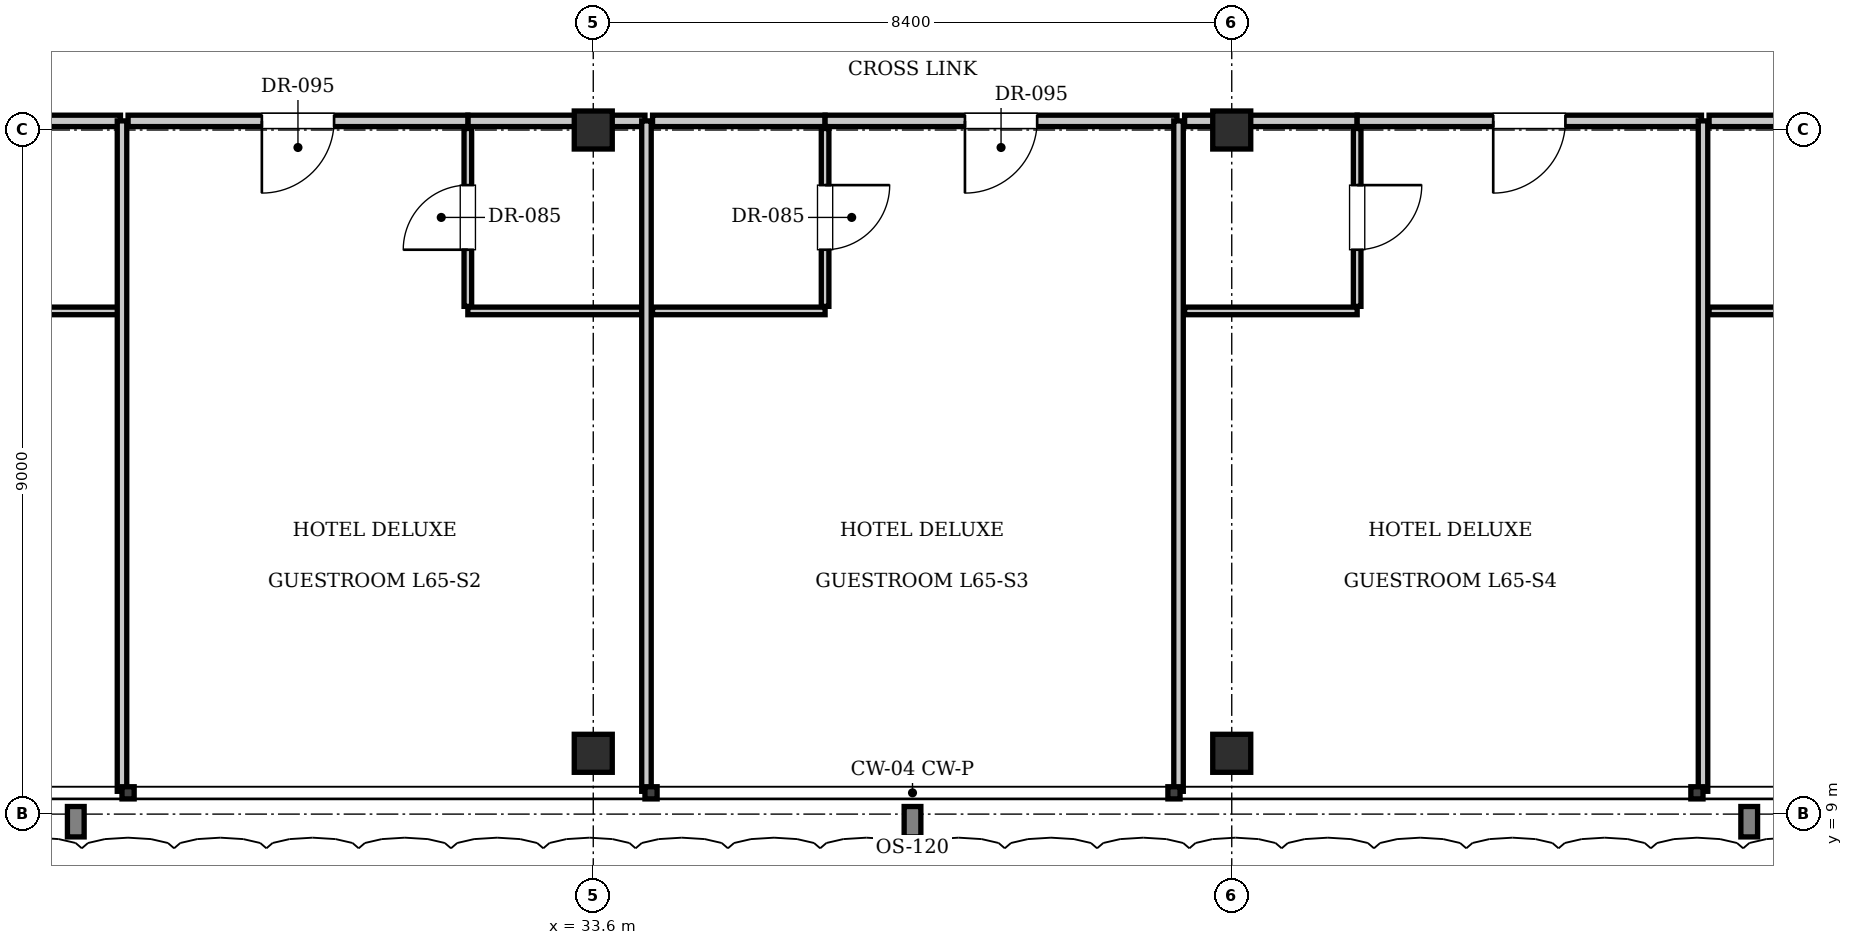
"""IFC4 building model, lengths in metres.
Left out: names, types, materials, properties, quantities, classifications, styles, units other than length and angle.
Written with IfcOpenShell. Run it as: python <this file> out.ifc"""

import sys

from ifc_helpers import new_model, si_unit, direction, frame, frame_2d, origin, origin_2d, place, context, subcontext, project, spatial, rectangle, i_section, extrude, element, fill, save


model = new_model("IFC4")
c1 = context("Model", 3, precision=1e-05, world=origin(), true_north=direction((0.0, 1.0)))
c2 = subcontext(c1, "Body", "Model", "MODEL_VIEW")
j1 = project(units=[si_unit("LENGTHUNIT", "METRE"), si_unit("PLANEANGLEUNIT", "RADIAN")], contexts=[c1])
p1 = place(None, origin())
s1 = spatial("IfcSite", under=j1, at=p1, CompositionType="ELEMENT")
p2 = place(p1, origin())
s2 = spatial("IfcBuilding", under=s1, at=p2, CompositionType="ELEMENT")
p3 = place(p2, frame((0.0, 0.0, 266.35)))
s3 = spatial("IfcBuildingStorey", under=s2, at=p3, CompositionType="ELEMENT", Elevation=266.35)
for number, where, z_axis, x_axis in (
    (1, (33.6, 18.0, 0.0), (0.0, 0.0, 1.0), (1.0, 0.0, 0.0)),
    (2, (42.0, 18.0, 0.0), (0.0, 0.0, 1.0), (1.0, 0.0, 0.0)),
    (3, (33.6, 9.8, 0.0), (0.0, 0.0, 1.0), (1.0, 0.0, 0.0)),
    (4, (42.0, 9.8, 0.0), (0.0, 0.0, 1.0), (1.0, 0.0, 0.0)),
):
    element("IfcColumn", number, at=place(p3, frame(where, z_axis=z_axis, x_axis=x_axis)), inside=s3, PredefinedType="COLUMN", context=c2, shape_type="SweptSolid", body=[
        extrude(i_section(OverallWidth=0.5, OverallDepth=0.5, WebThickness=0.022, FlangeThickness=0.032, at=origin_2d()), origin(), (0.0, 0.0, 1.0), 3.85),
    ])
p4 = place(p3, frame((25.05, 18.12, 0.0), z_axis=(0.0, 0.0, 1.0), x_axis=(1.0, 0.0, 0.0)))
e5 = element("IfcWall", 5, at=p4, inside=s3, PredefinedType="PARTITIONING", context=c2, shape_type="SweptSolid", body=[
    extrude(rectangle(XDim=2.33, YDim=0.15, at=frame_2d((1.165, 0.0))), origin(), (0.0, 0.0, 1.0), 3.077),
])
p5 = place(p3, frame((25.05, 15.62, 0.0), z_axis=(0.0, 0.0, 1.0), x_axis=(1.0, 0.0, 0.0)))
e6 = element("IfcWall", 6, at=p5, inside=s3, PredefinedType="PARTITIONING", context=c2, shape_type="SweptSolid", body=[
    extrude(rectangle(XDim=2.31, YDim=0.1, at=frame_2d((1.155, 0.0))), origin(), (0.0, 0.0, 1.0), 3.61),
])
p6 = place(p3, frame((27.4, 9.3, 0.0), z_axis=(0.0, 0.0, 1.0), x_axis=(0.0, 1.0, 0.0)))
e7 = element("IfcWall", 7, at=p6, inside=s3, PredefinedType="PARTITIONING", context=c2, shape_type="SweptSolid", body=[
    extrude(rectangle(XDim=8.82, YDim=0.125, at=frame_2d((4.41, 0.0))), origin(), (0.0, 0.0, 1.0), 3.61),
])
p7 = place(p3, frame((31.95, 18.12, 0.0), z_axis=(0.0, 0.0, 1.0), x_axis=(1.0, 0.0, 0.0)))
e8 = element("IfcWall", 8, at=p7, inside=s3, PredefinedType="PARTITIONING", context=c2, shape_type="SweptSolid", body=[
    extrude(rectangle(XDim=2.33, YDim=0.15, at=frame_2d((1.165, 0.0))), origin(), (0.0, 0.0, 1.0), 3.077),
])
p8 = place(p3, frame((31.95, 15.62, 0.0), z_axis=(0.0, 0.0, 1.0), x_axis=(1.0, 0.0, 0.0)))
e9 = element("IfcWall", 9, at=p8, inside=s3, PredefinedType="PARTITIONING", context=c2, shape_type="SweptSolid", body=[
    extrude(rectangle(XDim=2.31, YDim=0.1, at=frame_2d((1.155, 0.0))), origin(), (0.0, 0.0, 1.0), 3.61),
])
p9 = place(p3, frame((31.95, 15.68, 0.0), z_axis=(0.0, 0.0, 1.0), x_axis=(0.0, 1.0, 0.0)))
e10 = element("IfcWall", 10, at=p9, inside=s3, PredefinedType="PARTITIONING", context=c2, shape_type="SweptSolid", body=[
    extrude(rectangle(XDim=2.34, YDim=0.1, at=frame_2d((1.17, 0.0))), origin(), (0.0, 0.0, 1.0), 3.61),
])
p10 = place(p9, frame((0.745, 0.0, 0.0)))
e11 = element("IfcOpeningElement", 11, at=p10, cuts=e10, PredefinedType="OPENING", context=c2, shape_type="SweptSolid", body=[
    extrude(rectangle(XDim=0.85, YDim=2.1, at=frame_2d((0.425, 1.05))), frame((0.0, 0.06, 0.0), z_axis=(0.0, -1.0, 0.0), x_axis=(1.0, 0.0, 0.0)), (0.0, 0.0, 1.0), 0.12),
])
p11 = place(p3, frame((27.48, 18.12, 0.0), z_axis=(0.0, 0.0, 1.0), x_axis=(1.0, 0.0, 0.0)))
e12 = element("IfcWall", 12, at=p11, inside=s3, PredefinedType="PARTITIONING", context=c2, shape_type="SweptSolid", body=[
    extrude(rectangle(XDim=4.47, YDim=0.15, at=frame_2d((2.235, 0.0))), origin(), (0.0, 0.0, 1.0), 3.077),
])
p12 = place(p11, frame((1.76, 0.0, 0.0)))
e13 = element("IfcOpeningElement", 13, at=p12, cuts=e12, PredefinedType="OPENING", context=c2, shape_type="SweptSolid", body=[
    extrude(rectangle(XDim=0.95, YDim=2.15, at=frame_2d((0.475, 1.075))), frame((0.0, 0.085, 0.0), z_axis=(0.0, -1.0, 0.0), x_axis=(1.0, 0.0, 0.0)), (0.0, 0.0, 1.0), 0.17),
])
p13 = place(p3, frame((34.3, 9.3, 0.0), z_axis=(0.0, 0.0, 1.0), x_axis=(0.0, 1.0, 0.0)))
e14 = element("IfcWall", 14, at=p13, inside=s3, PredefinedType="PARTITIONING", context=c2, shape_type="SweptSolid", body=[
    extrude(rectangle(XDim=8.82, YDim=0.125, at=frame_2d((4.41, 0.0))), origin(), (0.0, 0.0, 1.0), 3.61),
])
p14 = place(p3, frame((34.38, 18.12, 0.0), z_axis=(0.0, 0.0, 1.0), x_axis=(1.0, 0.0, 0.0)))
e15 = element("IfcWall", 15, at=p14, inside=s3, PredefinedType="PARTITIONING", context=c2, shape_type="SweptSolid", body=[
    extrude(rectangle(XDim=2.27, YDim=0.15, at=frame_2d((1.135, 0.0))), origin(), (0.0, 0.0, 1.0), 3.077),
])
p15 = place(p3, frame((34.38, 15.62, 0.0), z_axis=(0.0, 0.0, 1.0), x_axis=(1.0, 0.0, 0.0)))
e16 = element("IfcWall", 16, at=p15, inside=s3, PredefinedType="PARTITIONING", context=c2, shape_type="SweptSolid", body=[
    extrude(rectangle(XDim=2.27, YDim=0.1, at=frame_2d((1.135, 0.0))), origin(), (0.0, 0.0, 1.0), 3.61),
])
p16 = place(p3, frame((36.65, 15.68, 0.0), z_axis=(0.0, 0.0, 1.0), x_axis=(0.0, 1.0, 0.0)))
e17 = element("IfcWall", 17, at=p16, inside=s3, PredefinedType="PARTITIONING", context=c2, shape_type="SweptSolid", body=[
    extrude(rectangle(XDim=2.34, YDim=0.1, at=frame_2d((1.17, 0.0))), origin(), (0.0, 0.0, 1.0), 3.61),
])
p17 = place(p16, frame((0.745, 0.0, 0.0)))
e18 = element("IfcOpeningElement", 18, at=p17, cuts=e17, PredefinedType="OPENING", context=c2, shape_type="SweptSolid", body=[
    extrude(rectangle(XDim=0.85, YDim=2.1, at=frame_2d((0.425, 1.05))), frame((0.0, 0.06, 0.0), z_axis=(0.0, -1.0, 0.0), x_axis=(1.0, 0.0, 0.0)), (0.0, 0.0, 1.0), 0.12),
])
p18 = place(p3, frame((36.65, 18.12, 0.0), z_axis=(0.0, 0.0, 1.0), x_axis=(1.0, 0.0, 0.0)))
e19 = element("IfcWall", 19, at=p18, inside=s3, PredefinedType="PARTITIONING", context=c2, shape_type="SweptSolid", body=[
    extrude(rectangle(XDim=4.63, YDim=0.15, at=frame_2d((2.315, 0.0))), origin(), (0.0, 0.0, 1.0), 3.077),
])
p19 = place(p18, frame((1.84, 0.0, 0.0)))
e20 = element("IfcOpeningElement", 20, at=p19, cuts=e19, PredefinedType="OPENING", context=c2, shape_type="SweptSolid", body=[
    extrude(rectangle(XDim=0.95, YDim=2.15, at=frame_2d((0.475, 1.075))), frame((0.0, 0.085, 0.0), z_axis=(0.0, -1.0, 0.0), x_axis=(1.0, 0.0, 0.0)), (0.0, 0.0, 1.0), 0.17),
])
p20 = place(p3, frame((41.3, 9.3, 0.0), z_axis=(0.0, 0.0, 1.0), x_axis=(0.0, 1.0, 0.0)))
e21 = element("IfcWall", 21, at=p20, inside=s3, PredefinedType="PARTITIONING", context=c2, shape_type="SweptSolid", body=[
    extrude(rectangle(XDim=8.82, YDim=0.125, at=frame_2d((4.41, 0.0))), origin(), (0.0, 0.0, 1.0), 3.61),
])
p21 = place(p3, frame((41.38, 18.12, 0.0), z_axis=(0.0, 0.0, 1.0), x_axis=(1.0, 0.0, 0.0)))
e22 = element("IfcWall", 22, at=p21, inside=s3, PredefinedType="PARTITIONING", context=c2, shape_type="SweptSolid", body=[
    extrude(rectangle(XDim=2.27, YDim=0.15, at=frame_2d((1.135, 0.0))), origin(), (0.0, 0.0, 1.0), 3.077),
])
p22 = place(p3, frame((41.38, 15.62, 0.0), z_axis=(0.0, 0.0, 1.0), x_axis=(1.0, 0.0, 0.0)))
e23 = element("IfcWall", 23, at=p22, inside=s3, PredefinedType="PARTITIONING", context=c2, shape_type="SweptSolid", body=[
    extrude(rectangle(XDim=2.27, YDim=0.1, at=frame_2d((1.135, 0.0))), origin(), (0.0, 0.0, 1.0), 3.61),
])
p23 = place(p3, frame((43.65, 15.68, 0.0), z_axis=(0.0, 0.0, 1.0), x_axis=(0.0, 1.0, 0.0)))
e24 = element("IfcWall", 24, at=p23, inside=s3, PredefinedType="PARTITIONING", context=c2, shape_type="SweptSolid", body=[
    extrude(rectangle(XDim=2.34, YDim=0.1, at=frame_2d((1.17, 0.0))), origin(), (0.0, 0.0, 1.0), 3.61),
])
p24 = place(p23, frame((0.745, 0.0, 0.0)))
e25 = element("IfcOpeningElement", 25, at=p24, cuts=e24, PredefinedType="OPENING", context=c2, shape_type="SweptSolid", body=[
    extrude(rectangle(XDim=0.85, YDim=2.1, at=frame_2d((0.425, 1.05))), frame((0.0, 0.06, 0.0), z_axis=(0.0, -1.0, 0.0), x_axis=(1.0, 0.0, 0.0)), (0.0, 0.0, 1.0), 0.12),
])
p25 = place(p3, frame((43.65, 18.12, 0.0), z_axis=(0.0, 0.0, 1.0), x_axis=(1.0, 0.0, 0.0)))
e26 = element("IfcWall", 26, at=p25, inside=s3, PredefinedType="PARTITIONING", context=c2, shape_type="SweptSolid", body=[
    extrude(rectangle(XDim=4.53, YDim=0.15, at=frame_2d((2.265, 0.0))), origin(), (0.0, 0.0, 1.0), 3.077),
])
p26 = place(p25, frame((1.79, 0.0, 0.0)))
e27 = element("IfcOpeningElement", 27, at=p26, cuts=e26, PredefinedType="OPENING", context=c2, shape_type="SweptSolid", body=[
    extrude(rectangle(XDim=0.95, YDim=2.15, at=frame_2d((0.475, 1.075))), frame((0.0, 0.085, 0.0), z_axis=(0.0, -1.0, 0.0), x_axis=(1.0, 0.0, 0.0)), (0.0, 0.0, 1.0), 0.17),
])
p27 = place(p3, frame((48.2, 9.3, 0.0), z_axis=(0.0, 0.0, 1.0), x_axis=(0.0, 1.0, 0.0)))
e28 = element("IfcWall", 28, at=p27, inside=s3, PredefinedType="PARTITIONING", context=c2, shape_type="SweptSolid", body=[
    extrude(rectangle(XDim=8.82, YDim=0.125, at=frame_2d((4.41, 0.0))), origin(), (0.0, 0.0, 1.0), 3.61),
])
p28 = place(p3, frame((48.28, 18.12, 0.0), z_axis=(0.0, 0.0, 1.0), x_axis=(1.0, 0.0, 0.0)))
e29 = element("IfcWall", 29, at=p28, inside=s3, PredefinedType="PARTITIONING", context=c2, shape_type="SweptSolid", body=[
    extrude(rectangle(XDim=2.27, YDim=0.15, at=frame_2d((1.135, 0.0))), origin(), (0.0, 0.0, 1.0), 3.077),
])
p29 = place(p3, frame((48.28, 15.62, 0.0), z_axis=(0.0, 0.0, 1.0), x_axis=(1.0, 0.0, 0.0)))
e30 = element("IfcWall", 30, at=p29, inside=s3, PredefinedType="PARTITIONING", context=c2, shape_type="SweptSolid", body=[
    extrude(rectangle(XDim=2.27, YDim=0.1, at=frame_2d((1.135, 0.0))), origin(), (0.0, 0.0, 1.0), 3.61),
])
p30 = place(p10, origin())
e31 = element("IfcDoor", 31, at=p30, inside=s3, OperationType="SINGLE_SWING_LEFT", PredefinedType="DOOR", context=c2, shape_type="SweptSolid", body=[
    extrude(rectangle(XDim=0.85, YDim=2.1, at=frame_2d((0.425, 1.05))), frame((0.0, 0.025, 0.0), z_axis=(0.0, -1.0, 0.0), x_axis=(1.0, 0.0, 0.0)), (0.0, 0.0, 1.0), 0.05),
])
fill(e11, e31)
p31 = place(p12, frame((0.95, 0.0, 0.0), z_axis=(0.0, 0.0, 1.0), x_axis=(-1.0, 0.0, 0.0)))
e32 = element("IfcDoor", 32, at=p31, inside=s3, OperationType="SINGLE_SWING_RIGHT", PredefinedType="DOOR", context=c2, shape_type="SweptSolid", body=[
    extrude(rectangle(XDim=0.95, YDim=2.15, at=frame_2d((0.475, 1.075))), frame((0.0, 0.025, 0.0), z_axis=(0.0, -1.0, 0.0), x_axis=(1.0, 0.0, 0.0)), (0.0, 0.0, 1.0), 0.05),
])
fill(e13, e32)
p32 = place(p17, frame((0.85, 0.0, 0.0), z_axis=(0.0, 0.0, 1.0), x_axis=(-1.0, 0.0, 0.0)))
e33 = element("IfcDoor", 33, at=p32, inside=s3, OperationType="SINGLE_SWING_LEFT", PredefinedType="DOOR", context=c2, shape_type="SweptSolid", body=[
    extrude(rectangle(XDim=0.85, YDim=2.1, at=frame_2d((0.425, 1.05))), frame((0.0, 0.025, 0.0), z_axis=(0.0, -1.0, 0.0), x_axis=(1.0, 0.0, 0.0)), (0.0, 0.0, 1.0), 0.05),
])
fill(e18, e33)
p33 = place(p19, frame((0.95, 0.0, 0.0), z_axis=(0.0, 0.0, 1.0), x_axis=(-1.0, 0.0, 0.0)))
e34 = element("IfcDoor", 34, at=p33, inside=s3, OperationType="SINGLE_SWING_RIGHT", PredefinedType="DOOR", context=c2, shape_type="SweptSolid", body=[
    extrude(rectangle(XDim=0.95, YDim=2.15, at=frame_2d((0.475, 1.075))), frame((0.0, 0.025, 0.0), z_axis=(0.0, -1.0, 0.0), x_axis=(1.0, 0.0, 0.0)), (0.0, 0.0, 1.0), 0.05),
])
fill(e20, e34)
p34 = place(p24, frame((0.85, 0.0, 0.0), z_axis=(0.0, 0.0, 1.0), x_axis=(-1.0, 0.0, 0.0)))
e35 = element("IfcDoor", 35, at=p34, inside=s3, OperationType="SINGLE_SWING_LEFT", PredefinedType="DOOR", context=c2, shape_type="SweptSolid", body=[
    extrude(rectangle(XDim=0.85, YDim=2.1, at=frame_2d((0.425, 1.05))), frame((0.0, 0.025, 0.0), z_axis=(0.0, -1.0, 0.0), x_axis=(1.0, 0.0, 0.0)), (0.0, 0.0, 1.0), 0.05),
])
fill(e25, e35)
p35 = place(p26, frame((0.95, 0.0, 0.0), z_axis=(0.0, 0.0, 1.0), x_axis=(-1.0, 0.0, 0.0)))
e36 = element("IfcDoor", 36, at=p35, inside=s3, OperationType="SINGLE_SWING_RIGHT", PredefinedType="DOOR", context=c2, shape_type="SweptSolid", body=[
    extrude(rectangle(XDim=0.95, YDim=2.15, at=frame_2d((0.475, 1.075))), frame((0.0, 0.025, 0.0), z_axis=(0.0, -1.0, 0.0), x_axis=(1.0, 0.0, 0.0)), (0.0, 0.0, 1.0), 0.05),
])
fill(e27, e36)
save(model, sys.argv[1])
